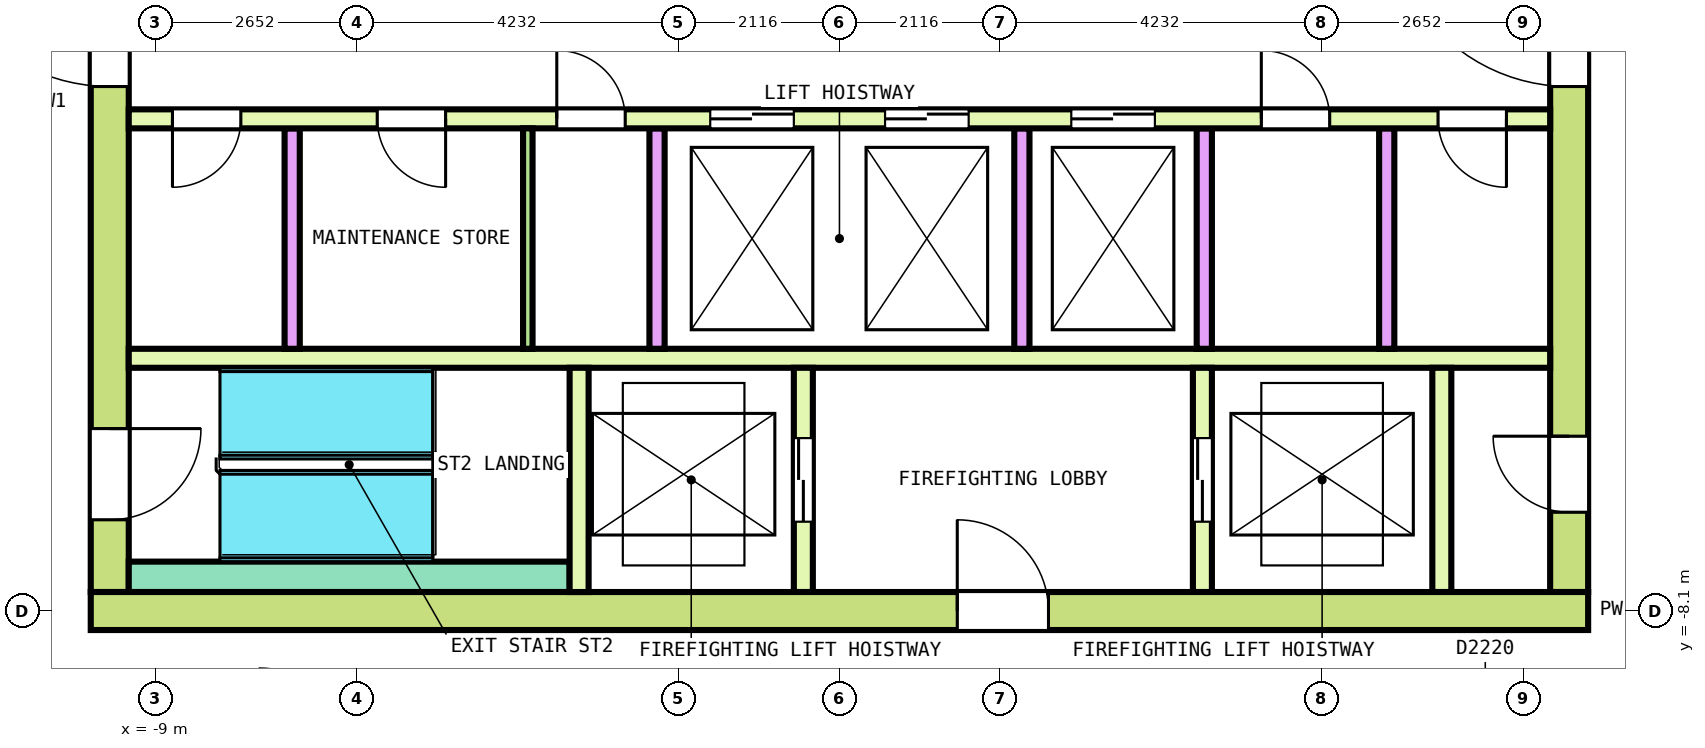
"""IFC4 building model, lengths in metres.
Left out: names, types, materials, properties, quantities, classifications, styles, units other than length and angle.
Written with IfcOpenShell. Run it as: python <this file> out.ifc"""

import sys

from ifc_helpers import new_model, si_unit, direction, frame, frame_2d, origin, place, context, subcontext, project, spatial, rectangle, extrude, element, fill, save


model = new_model("IFC4")
c1 = context("Model", 3, precision=1e-05, world=origin(), true_north=direction((0.0, 1.0)))
c2 = subcontext(c1, "Body", "Model", "MODEL_VIEW")
j1 = project(units=[si_unit("LENGTHUNIT", "METRE"), si_unit("PLANEANGLEUNIT", "RADIAN")], contexts=[c1])
p1 = place(None, origin())
s1 = spatial("IfcSite", under=j1, at=p1, CompositionType="ELEMENT")
p2 = place(p1, origin())
s2 = spatial("IfcBuilding", under=s1, at=p2, CompositionType="ELEMENT")
p3 = place(p2, frame((0.0, 0.0, 287.0)))
s3 = spatial("IfcBuildingStorey", under=s2, at=p3, CompositionType="ELEMENT", Elevation=287.0)
p4 = place(p3, frame((-9.85, -8.1, 0.0), z_axis=(0.0, 0.0, 1.0), x_axis=(1.0, 0.0, 0.0)))
e1 = element("IfcWall", 1, at=p4, inside=s3, PredefinedType="SHEAR", context=c2, shape_type="SweptSolid", body=[
    extrude(rectangle(XDim=19.7, YDim=0.5, at=frame_2d((9.85, 0.0))), origin(), (0.0, 0.0, 1.0), 3.7),
])
p5 = place(p4, frame((11.4, 0.0, 0.0)))
e2 = element("IfcOpeningElement", 2, at=p5, cuts=e1, PredefinedType="OPENING", context=c2, shape_type="SweptSolid", body=[
    extrude(rectangle(XDim=1.2, YDim=2.1, at=frame_2d((0.6, 1.05))), frame((0.0, 0.26, 0.0), z_axis=(0.0, -1.0, 0.0), x_axis=(1.0, 0.0, 0.0)), (0.0, 0.0, 1.0), 0.52),
])
p6 = place(p3, frame((-9.6, -7.85, 0.0), z_axis=(0.0, 0.0, 1.0), x_axis=(0.0, 1.0, 0.0)))
e3 = element("IfcWall", 3, at=p6, inside=s3, PredefinedType="SHEAR", context=c2, shape_type="SweptSolid", body=[
    extrude(rectangle(XDim=15.7, YDim=0.5, at=frame_2d((7.85, 0.0))), origin(), (0.0, 0.0, 1.0), 3.7),
])
p7 = place(p6, frame((6.65, 0.0, 0.0)))
e4 = element("IfcOpeningElement", 4, at=p7, cuts=e3, PredefinedType="OPENING", context=c2, shape_type="SweptSolid", body=[
    extrude(rectangle(XDim=2.4, YDim=2.1, at=frame_2d((1.2, 1.05))), frame((0.0, 0.26, 0.0), z_axis=(0.0, -1.0, 0.0), x_axis=(1.0, 0.0, 0.0)), (0.0, 0.0, 1.0), 0.52),
])
p8 = place(p6, frame((13.55, 0.0, 0.0)))
e5 = element("IfcOpeningElement", 5, at=p8, cuts=e3, PredefinedType="OPENING", context=c2, shape_type="SweptSolid", body=[
    extrude(rectangle(XDim=1.2, YDim=2.1, at=frame_2d((0.6, 1.05))), frame((0.0, 0.26, 0.0), z_axis=(0.0, -1.0, 0.0), x_axis=(1.0, 0.0, 0.0)), (0.0, 0.0, 1.0), 0.52),
])
p9 = place(p6, frame((0.95, 0.0, 0.0)))
e6 = element("IfcOpeningElement", 6, at=p9, cuts=e3, PredefinedType="OPENING", context=c2, shape_type="SweptSolid", body=[
    extrude(rectangle(XDim=1.2, YDim=2.1, at=frame_2d((0.6, 1.05))), frame((0.0, 0.26, 0.0), z_axis=(0.0, -1.0, 0.0), x_axis=(1.0, 0.0, 0.0)), (0.0, 0.0, 1.0), 0.52),
])
p10 = place(p3, frame((9.6, -7.85, 0.0), z_axis=(0.0, 0.0, 1.0), x_axis=(0.0, 1.0, 0.0)))
e7 = element("IfcWall", 7, at=p10, inside=s3, PredefinedType="SHEAR", context=c2, shape_type="SweptSolid", body=[
    extrude(rectangle(XDim=15.7, YDim=0.5, at=frame_2d((7.85, 0.0))), origin(), (0.0, 0.0, 1.0), 3.7),
])
p11 = place(p10, frame((6.65, 0.0, 0.0)))
e8 = element("IfcOpeningElement", 8, at=p11, cuts=e7, PredefinedType="OPENING", context=c2, shape_type="SweptSolid", body=[
    extrude(rectangle(XDim=2.4, YDim=2.1, at=frame_2d((1.2, 1.05))), frame((0.0, 0.26, 0.0), z_axis=(0.0, -1.0, 0.0), x_axis=(1.0, 0.0, 0.0)), (0.0, 0.0, 1.0), 0.52),
])
p12 = place(p10, frame((13.55, 0.0, 0.0)))
e9 = element("IfcOpeningElement", 9, at=p12, cuts=e7, PredefinedType="OPENING", context=c2, shape_type="SweptSolid", body=[
    extrude(rectangle(XDim=1.2, YDim=2.1, at=frame_2d((0.6, 1.05))), frame((0.0, 0.26, 0.0), z_axis=(0.0, -1.0, 0.0), x_axis=(1.0, 0.0, 0.0)), (0.0, 0.0, 1.0), 0.52),
])
p13 = place(p10, frame((1.05, 0.0, 0.0)))
e10 = element("IfcOpeningElement", 10, at=p13, cuts=e7, PredefinedType="OPENING", context=c2, shape_type="SweptSolid", body=[
    extrude(rectangle(XDim=1.0, YDim=2.1, at=frame_2d((0.5, 1.05))), frame((0.0, 0.26, 0.0), z_axis=(0.0, -1.0, 0.0), x_axis=(1.0, 0.0, 0.0)), (0.0, 0.0, 1.0), 0.52),
])
p14 = place(p3, frame((-9.35, -1.625, 0.0), z_axis=(0.0, 0.0, 1.0), x_axis=(1.0, 0.0, 0.0)))
e11 = element("IfcWall", 11, at=p14, inside=s3, PredefinedType="SOLIDWALL", context=c2, shape_type="SweptSolid", body=[
    extrude(rectangle(XDim=18.7, YDim=0.25, at=frame_2d((9.35, 0.0))), origin(), (0.0, 0.0, 1.0), 3.7),
])
p15 = place(p14, frame((7.65, 0.0, 0.0)))
e12 = element("IfcOpeningElement", 12, at=p15, cuts=e11, PredefinedType="OPENING", context=c2, shape_type="SweptSolid", body=[
    extrude(rectangle(XDim=1.1, YDim=2.1, at=frame_2d((0.55, 1.05))), frame((0.0, 0.135, 0.0), z_axis=(0.0, -1.0, 0.0), x_axis=(1.0, 0.0, 0.0)), (0.0, 0.0, 1.0), 0.27),
])
p16 = place(p14, frame((9.95, 0.0, 0.0)))
e13 = element("IfcOpeningElement", 13, at=p16, cuts=e11, PredefinedType="OPENING", context=c2, shape_type="SweptSolid", body=[
    extrude(rectangle(XDim=1.1, YDim=2.1, at=frame_2d((0.55, 1.05))), frame((0.0, 0.135, 0.0), z_axis=(0.0, -1.0, 0.0), x_axis=(1.0, 0.0, 0.0)), (0.0, 0.0, 1.0), 0.27),
])
p17 = place(p14, frame((12.4, 0.0, 0.0)))
e14 = element("IfcOpeningElement", 14, at=p17, cuts=e11, PredefinedType="OPENING", context=c2, shape_type="SweptSolid", body=[
    extrude(rectangle(XDim=1.1, YDim=2.1, at=frame_2d((0.55, 1.05))), frame((0.0, 0.135, 0.0), z_axis=(0.0, -1.0, 0.0), x_axis=(1.0, 0.0, 0.0)), (0.0, 0.0, 1.0), 0.27),
])
p18 = place(p14, frame((0.575, 0.0, 0.0)))
e15 = element("IfcOpeningElement", 15, at=p18, cuts=e11, PredefinedType="OPENING", context=c2, shape_type="SweptSolid", body=[
    extrude(rectangle(XDim=0.9, YDim=2.1, at=frame_2d((0.45, 1.05))), frame((0.0, 0.135, 0.0), z_axis=(0.0, -1.0, 0.0), x_axis=(1.0, 0.0, 0.0)), (0.0, 0.0, 1.0), 0.27),
])
p19 = place(p14, frame((3.269, 0.0, 0.0)))
e16 = element("IfcOpeningElement", 16, at=p19, cuts=e11, PredefinedType="OPENING", context=c2, shape_type="SweptSolid", body=[
    extrude(rectangle(XDim=0.9, YDim=2.1, at=frame_2d((0.45, 1.05))), frame((0.0, 0.135, 0.0), z_axis=(0.0, -1.0, 0.0), x_axis=(1.0, 0.0, 0.0)), (0.0, 0.0, 1.0), 0.27),
])
p20 = place(p14, frame((5.631, 0.0, 0.0)))
e17 = element("IfcOpeningElement", 17, at=p20, cuts=e11, PredefinedType="OPENING", context=c2, shape_type="SweptSolid", body=[
    extrude(rectangle(XDim=0.9, YDim=2.1, at=frame_2d((0.45, 1.05))), frame((0.0, 0.135, 0.0), z_axis=(0.0, -1.0, 0.0), x_axis=(1.0, 0.0, 0.0)), (0.0, 0.0, 1.0), 0.27),
])
p21 = place(p14, frame((14.9, 0.0, 0.0)))
e18 = element("IfcOpeningElement", 18, at=p21, cuts=e11, PredefinedType="OPENING", context=c2, shape_type="SweptSolid", body=[
    extrude(rectangle(XDim=0.9, YDim=2.1, at=frame_2d((0.45, 1.05))), frame((0.0, 0.135, 0.0), z_axis=(0.0, -1.0, 0.0), x_axis=(1.0, 0.0, 0.0)), (0.0, 0.0, 1.0), 0.27),
])
p22 = place(p14, frame((17.225, 0.0, 0.0)))
e19 = element("IfcOpeningElement", 19, at=p22, cuts=e11, PredefinedType="OPENING", context=c2, shape_type="SweptSolid", body=[
    extrude(rectangle(XDim=0.9, YDim=2.1, at=frame_2d((0.45, 1.05))), frame((0.0, 0.135, 0.0), z_axis=(0.0, -1.0, 0.0), x_axis=(1.0, 0.0, 0.0)), (0.0, 0.0, 1.0), 0.27),
])
p23 = place(p3, frame((-9.35, -4.775, 0.0), z_axis=(0.0, 0.0, 1.0), x_axis=(1.0, 0.0, 0.0)))
e20 = element("IfcWall", 20, at=p23, inside=s3, PredefinedType="SOLIDWALL", context=c2, shape_type="SweptSolid", body=[
    extrude(rectangle(XDim=18.7, YDim=0.25, at=frame_2d((9.35, 0.0))), origin(), (0.0, 0.0, 1.0), 3.7),
])
for number, where, z_axis, x_axis in (
    (21, (-7.2, -4.65, 0.0), (0.0, 0.0, 1.0), (0.0, 1.0, 0.0)),
    (22, (-2.4, -4.65, 0.0), (0.0, 0.0, 1.0), (0.0, 1.0, 0.0)),
    (23, (2.4, -4.65, 0.0), (0.0, 0.0, 1.0), (0.0, 1.0, 0.0)),
    (24, (4.8, -4.65, 0.0), (0.0, 0.0, 1.0), (0.0, 1.0, 0.0)),
    (25, (7.2, -4.65, 0.0), (0.0, 0.0, 1.0), (0.0, 1.0, 0.0)),
):
    element("IfcWall", number, at=place(p3, frame(where, z_axis=z_axis, x_axis=x_axis)), inside=s3, PredefinedType="SOLIDWALL", context=c2, shape_type="SweptSolid", body=[
        extrude(rectangle(XDim=2.9, YDim=0.2, at=frame_2d((1.45, 0.0))), origin(), (0.0, 0.0, 1.0), 3.7),
    ])
p24 = place(p3, frame((-9.35, -7.65, 0.0), z_axis=(0.0, 0.0, 1.0), x_axis=(1.0, 0.0, 0.0)))
e26 = element("IfcWall", 26, at=p24, inside=s3, PredefinedType="SOLIDWALL", context=c2, shape_type="SweptSolid", body=[
    extrude(rectangle(XDim=5.8, YDim=0.4, at=frame_2d((2.9, 0.0))), origin(), (0.0, 0.0, 1.0), 3.7),
])
p25 = place(p3, frame((-3.425, -7.85, 0.0), z_axis=(0.0, 0.0, 1.0), x_axis=(0.0, 1.0, 0.0)))
e27 = element("IfcWall", 27, at=p25, inside=s3, PredefinedType="SOLIDWALL", context=c2, shape_type="SweptSolid", body=[
    extrude(rectangle(XDim=2.95, YDim=0.25, at=frame_2d((1.475, 0.0))), origin(), (0.0, 0.0, 1.0), 3.7),
])
p26 = place(p3, frame((-0.475, -7.85, 0.0), z_axis=(0.0, 0.0, 1.0), x_axis=(0.0, 1.0, 0.0)))
e28 = element("IfcWall", 28, at=p26, inside=s3, PredefinedType="SOLIDWALL", context=c2, shape_type="SweptSolid", body=[
    extrude(rectangle(XDim=2.95, YDim=0.25, at=frame_2d((1.475, 0.0))), origin(), (0.0, 0.0, 1.0), 3.7),
])
p27 = place(p26, frame((0.925, 0.0, 0.0)))
e29 = element("IfcOpeningElement", 29, at=p27, cuts=e28, PredefinedType="OPENING", context=c2, shape_type="SweptSolid", body=[
    extrude(rectangle(XDim=1.1, YDim=2.1, at=frame_2d((0.55, 1.05))), frame((0.0, 0.135, 0.0), z_axis=(0.0, -1.0, 0.0), x_axis=(1.0, 0.0, 0.0)), (0.0, 0.0, 1.0), 0.27),
])
p28 = place(p3, frame((4.775, -7.85, 0.0), z_axis=(0.0, 0.0, 1.0), x_axis=(0.0, 1.0, 0.0)))
e30 = element("IfcWall", 30, at=p28, inside=s3, PredefinedType="SOLIDWALL", context=c2, shape_type="SweptSolid", body=[
    extrude(rectangle(XDim=2.95, YDim=0.25, at=frame_2d((1.475, 0.0))), origin(), (0.0, 0.0, 1.0), 3.7),
])
p29 = place(p28, frame((0.925, 0.0, 0.0)))
e31 = element("IfcOpeningElement", 31, at=p29, cuts=e30, PredefinedType="OPENING", context=c2, shape_type="SweptSolid", body=[
    extrude(rectangle(XDim=1.1, YDim=2.1, at=frame_2d((0.55, 1.05))), frame((0.0, 0.135, 0.0), z_axis=(0.0, -1.0, 0.0), x_axis=(1.0, 0.0, 0.0)), (0.0, 0.0, 1.0), 0.27),
])
p30 = place(p3, frame((7.925, -7.85, 0.0), z_axis=(0.0, 0.0, 1.0), x_axis=(0.0, 1.0, 0.0)))
e32 = element("IfcWall", 32, at=p30, inside=s3, PredefinedType="SOLIDWALL", context=c2, shape_type="SweptSolid", body=[
    extrude(rectangle(XDim=2.95, YDim=0.25, at=frame_2d((1.475, 0.0))), origin(), (0.0, 0.0, 1.0), 3.7),
])
p31 = place(p3, frame((-4.1, -4.65, 0.0), z_axis=(0.0, 0.0, 1.0), x_axis=(0.0, 1.0, 0.0)))
e33 = element("IfcWall", 33, at=p31, inside=s3, PredefinedType="PARTITIONING", context=c2, shape_type="SweptSolid", body=[
    extrude(rectangle(XDim=2.9, YDim=0.125, at=frame_2d((1.45, 0.0))), origin(), (0.0, 0.0, 1.0), 3.7),
])
p32 = place(p15, origin())
e34 = element("IfcDoor", 34, at=p32, inside=s3, OperationType="DOUBLE_DOOR_SLIDING", PredefinedType="DOOR", context=c2, shape_type="SweptSolid", body=[
    extrude(rectangle(XDim=1.1, YDim=2.1, at=frame_2d((0.55, 1.05))), frame((0.0, 0.075, 0.0), z_axis=(0.0, -1.0, 0.0), x_axis=(1.0, 0.0, 0.0)), (0.0, 0.0, 1.0), 0.15),
])
fill(e12, e34)
p33 = place(p16, origin())
e35 = element("IfcDoor", 35, at=p33, inside=s3, OperationType="DOUBLE_DOOR_SLIDING", PredefinedType="DOOR", context=c2, shape_type="SweptSolid", body=[
    extrude(rectangle(XDim=1.1, YDim=2.1, at=frame_2d((0.55, 1.05))), frame((0.0, 0.075, 0.0), z_axis=(0.0, -1.0, 0.0), x_axis=(1.0, 0.0, 0.0)), (0.0, 0.0, 1.0), 0.15),
])
fill(e13, e35)
p34 = place(p17, origin())
e36 = element("IfcDoor", 36, at=p34, inside=s3, OperationType="DOUBLE_DOOR_SLIDING", PredefinedType="DOOR", context=c2, shape_type="SweptSolid", body=[
    extrude(rectangle(XDim=1.1, YDim=2.1, at=frame_2d((0.55, 1.05))), frame((0.0, 0.075, 0.0), z_axis=(0.0, -1.0, 0.0), x_axis=(1.0, 0.0, 0.0)), (0.0, 0.0, 1.0), 0.15),
])
fill(e14, e36)
p35 = place(p27, origin())
e37 = element("IfcDoor", 37, at=p35, inside=s3, OperationType="DOUBLE_DOOR_SLIDING", PredefinedType="DOOR", context=c2, shape_type="SweptSolid", body=[
    extrude(rectangle(XDim=1.1, YDim=2.1, at=frame_2d((0.55, 1.05))), frame((0.0, 0.075, 0.0), z_axis=(0.0, -1.0, 0.0), x_axis=(1.0, 0.0, 0.0)), (0.0, 0.0, 1.0), 0.15),
])
fill(e29, e37)
p36 = place(p29, origin())
e38 = element("IfcDoor", 38, at=p36, inside=s3, OperationType="DOUBLE_DOOR_SLIDING", PredefinedType="DOOR", context=c2, shape_type="SweptSolid", body=[
    extrude(rectangle(XDim=1.1, YDim=2.1, at=frame_2d((0.55, 1.05))), frame((0.0, 0.075, 0.0), z_axis=(0.0, -1.0, 0.0), x_axis=(1.0, 0.0, 0.0)), (0.0, 0.0, 1.0), 0.15),
])
fill(e31, e38)
p37 = place(p7, origin())
e39 = element("IfcDoor", 39, at=p37, inside=s3, OperationType="DOUBLE_DOOR_SINGLE_SWING", PredefinedType="DOOR", context=c2, shape_type="SweptSolid", body=[
    extrude(rectangle(XDim=2.4, YDim=2.1, at=frame_2d((1.2, 1.05))), frame((0.0, 0.2, 0.0), z_axis=(0.0, -1.0, 0.0), x_axis=(1.0, 0.0, 0.0)), (0.0, 0.0, 1.0), 0.4),
])
fill(e4, e39)
p38 = place(p11, origin())
e40 = element("IfcDoor", 40, at=p38, inside=s3, OperationType="DOUBLE_DOOR_SINGLE_SWING", PredefinedType="DOOR", context=c2, shape_type="SweptSolid", body=[
    extrude(rectangle(XDim=2.4, YDim=2.1, at=frame_2d((1.2, 1.05))), frame((0.0, 0.2, 0.0), z_axis=(0.0, -1.0, 0.0), x_axis=(1.0, 0.0, 0.0)), (0.0, 0.0, 1.0), 0.4),
])
fill(e8, e40)
p39 = place(p9, origin())
e41 = element("IfcDoor", 41, at=p39, inside=s3, OperationType="SINGLE_SWING_LEFT", PredefinedType="DOOR", context=c2, shape_type="SweptSolid", body=[
    extrude(rectangle(XDim=1.2, YDim=2.1, at=frame_2d((0.6, 1.05))), frame((0.0, 0.2, 0.0), z_axis=(0.0, -1.0, 0.0), x_axis=(1.0, 0.0, 0.0)), (0.0, 0.0, 1.0), 0.4),
])
fill(e6, e41)
p40 = place(p5, origin())
e42 = element("IfcDoor", 42, at=p40, inside=s3, OperationType="SINGLE_SWING_LEFT", PredefinedType="DOOR", context=c2, shape_type="SweptSolid", body=[
    extrude(rectangle(XDim=1.2, YDim=2.1, at=frame_2d((0.6, 1.05))), frame((0.0, 0.2, 0.0), z_axis=(0.0, -1.0, 0.0), x_axis=(1.0, 0.0, 0.0)), (0.0, 0.0, 1.0), 0.4),
])
fill(e2, e42)
p41 = place(p13, origin())
e43 = element("IfcDoor", 43, at=p41, inside=s3, OperationType="SINGLE_SWING_LEFT", PredefinedType="DOOR", context=c2, shape_type="SweptSolid", body=[
    extrude(rectangle(XDim=1.0, YDim=2.1, at=frame_2d((0.5, 1.05))), frame((0.0, 0.2, 0.0), z_axis=(0.0, -1.0, 0.0), x_axis=(1.0, 0.0, 0.0)), (0.0, 0.0, 1.0), 0.4),
])
fill(e10, e43)
p42 = place(p18, origin())
e44 = element("IfcDoor", 44, at=p42, inside=s3, OperationType="SINGLE_SWING_RIGHT", PredefinedType="DOOR", context=c2, shape_type="SweptSolid", body=[
    extrude(rectangle(XDim=0.9, YDim=2.1, at=frame_2d((0.45, 1.05))), frame((0.0, 0.075, 0.0), z_axis=(0.0, -1.0, 0.0), x_axis=(1.0, 0.0, 0.0)), (0.0, 0.0, 1.0), 0.15),
])
fill(e15, e44)
p43 = place(p19, origin())
e45 = element("IfcDoor", 45, at=p43, inside=s3, OperationType="SINGLE_SWING_LEFT", PredefinedType="DOOR", context=c2, shape_type="SweptSolid", body=[
    extrude(rectangle(XDim=0.9, YDim=2.1, at=frame_2d((0.45, 1.05))), frame((0.0, 0.075, 0.0), z_axis=(0.0, -1.0, 0.0), x_axis=(1.0, 0.0, 0.0)), (0.0, 0.0, 1.0), 0.15),
])
fill(e16, e45)
p44 = place(p20, origin())
e46 = element("IfcDoor", 46, at=p44, inside=s3, OperationType="SINGLE_SWING_RIGHT", PredefinedType="DOOR", context=c2, shape_type="SweptSolid", body=[
    extrude(rectangle(XDim=0.9, YDim=2.1, at=frame_2d((0.45, 1.05))), frame((0.0, 0.075, 0.0), z_axis=(0.0, -1.0, 0.0), x_axis=(1.0, 0.0, 0.0)), (0.0, 0.0, 1.0), 0.15),
])
fill(e17, e46)
p45 = place(p21, origin())
e47 = element("IfcDoor", 47, at=p45, inside=s3, OperationType="SINGLE_SWING_LEFT", PredefinedType="DOOR", context=c2, shape_type="SweptSolid", body=[
    extrude(rectangle(XDim=0.9, YDim=2.1, at=frame_2d((0.45, 1.05))), frame((0.0, 0.075, 0.0), z_axis=(0.0, -1.0, 0.0), x_axis=(1.0, 0.0, 0.0)), (0.0, 0.0, 1.0), 0.15),
])
fill(e18, e47)
p46 = place(p22, origin())
e48 = element("IfcDoor", 48, at=p46, inside=s3, OperationType="SINGLE_SWING_RIGHT", PredefinedType="DOOR", context=c2, shape_type="SweptSolid", body=[
    extrude(rectangle(XDim=0.9, YDim=2.1, at=frame_2d((0.45, 1.05))), frame((0.0, 0.075, 0.0), z_axis=(0.0, -1.0, 0.0), x_axis=(1.0, 0.0, 0.0)), (0.0, 0.0, 1.0), 0.15),
])
fill(e19, e48)
save(model, sys.argv[1])
